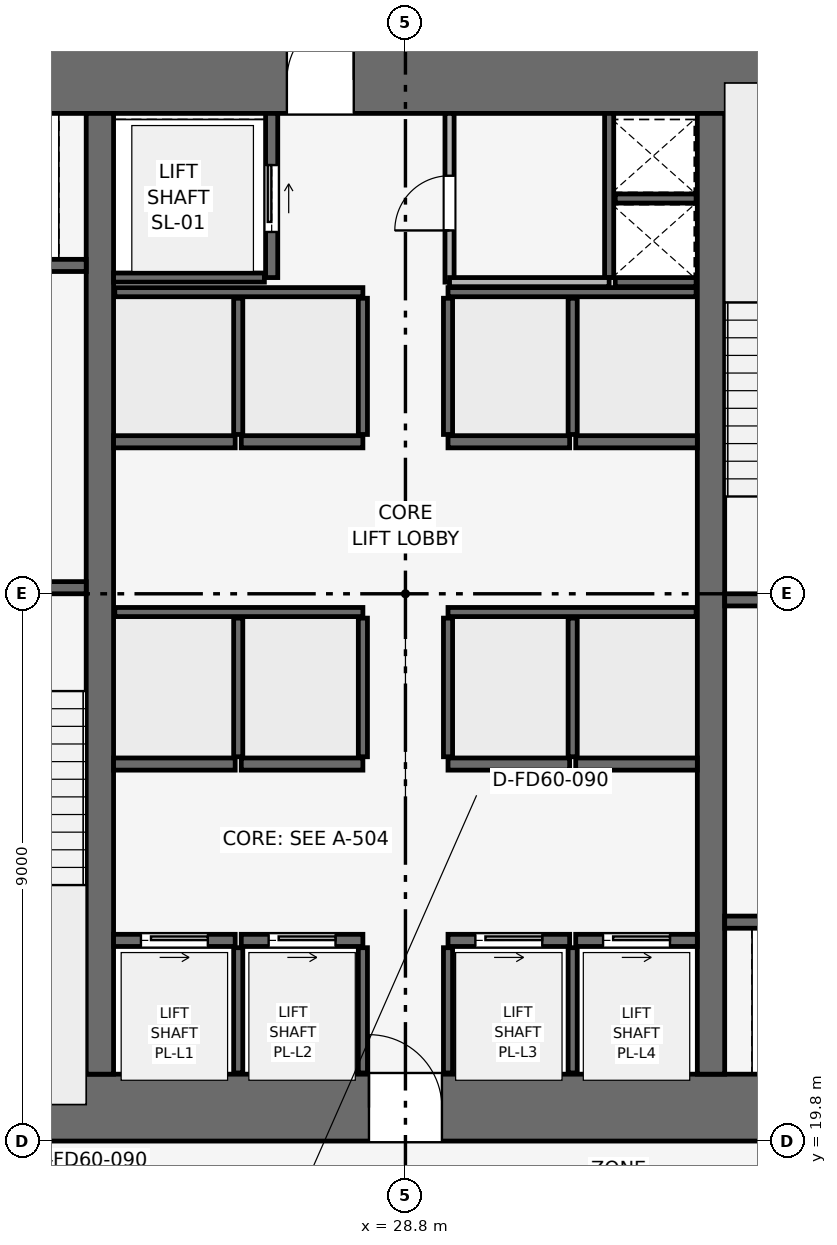
"""IFC4 building model, lengths in metres.
Left out: names, types, materials, properties, quantities, classifications, styles, units other than length and angle.
Written with IfcOpenShell. Run it as: python <this file> out.ifc"""

import sys

from ifc_helpers import new_model, si_unit, direction, frame, frame_2d, origin, place, context, subcontext, project, spatial, rectangle, extrude, element, fill, save


model = new_model("IFC4")
c1 = context("Model", 3, precision=1e-05, world=origin(), true_north=direction((0.0, 1.0)))
c2 = subcontext(c1, "Body", "Model", "MODEL_VIEW")
j1 = project(units=[si_unit("LENGTHUNIT", "METRE"), si_unit("PLANEANGLEUNIT", "RADIAN")], contexts=[c1])
p1 = place(None, origin())
s1 = spatial("IfcSite", under=j1, at=p1, CompositionType="ELEMENT")
p2 = place(p1, origin())
s2 = spatial("IfcBuilding", under=s1, at=p2, CompositionType="ELEMENT")
p3 = place(p2, frame((0.0, 0.0, 37.8)))
s3 = spatial("IfcBuildingStorey", under=s2, at=p3, CompositionType="ELEMENT", Elevation=37.8)
p4 = place(p3, frame((19.8, 20.35, 0.0), z_axis=(0.0, 0.0, 1.0), x_axis=(1.0, 0.0, 0.0)))
e1 = element("IfcWall", 1, at=p4, inside=s3, PredefinedType="SHEAR", context=c2, shape_type="SweptSolid", body=[
    extrude(rectangle(XDim=18.0, YDim=1.1, at=frame_2d((9.0, 0.0))), origin(), (0.0, 0.0, 1.0), 3.9),
])
p5 = place(p4, frame((8.4, 0.0, 0.0)))
e2 = element("IfcOpeningElement", 2, at=p5, cuts=e1, PredefinedType="OPENING", context=c2, shape_type="SweptSolid", body=[
    extrude(rectangle(XDim=1.2, YDim=2.2, at=frame_2d((0.6, 1.1))), frame((0.0, 0.56, 0.0), z_axis=(0.0, -1.0, 0.0), x_axis=(1.0, 0.0, 0.0)), (0.0, 0.0, 1.0), 1.12),
])
p6 = place(p3, frame((19.8, 37.25, 0.0), z_axis=(0.0, 0.0, 1.0), x_axis=(1.0, 0.0, 0.0)))
e3 = element("IfcWall", 3, at=p6, inside=s3, PredefinedType="SHEAR", context=c2, shape_type="SweptSolid", body=[
    extrude(rectangle(XDim=18.0, YDim=1.1, at=frame_2d((9.0, 0.0))), origin(), (0.0, 0.0, 1.0), 3.9),
])
p7 = place(p6, frame((7.05, 0.0, 0.0)))
e4 = element("IfcOpeningElement", 4, at=p7, cuts=e3, PredefinedType="OPENING", context=c2, shape_type="SweptSolid", body=[
    extrude(rectangle(XDim=1.1, YDim=2.15, at=frame_2d((0.55, 1.075))), frame((0.0, 0.56, 0.0), z_axis=(0.0, -1.0, 0.0), x_axis=(1.0, 0.0, 0.0)), (0.0, 0.0, 1.0), 1.12),
])
for number, where, z_axis, x_axis in (
    (5, (23.775, 20.9, 0.0), (0.0, 0.0, 1.0), (0.0, 1.0, 0.0)),
    (6, (33.825, 20.9, 0.0), (0.0, 0.0, 1.0), (0.0, 1.0, 0.0)),
):
    element("IfcWall", number, at=place(p3, frame(where, z_axis=z_axis, x_axis=x_axis)), inside=s3, PredefinedType="SHEAR", context=c2, shape_type="SweptSolid", body=[
        extrude(rectangle(XDim=15.8, YDim=0.45, at=frame_2d((7.9, 0.0))), origin(), (0.0, 0.0, 1.0), 3.9),
    ])
p8 = place(p3, frame((20.4, 28.9, 0.0), z_axis=(0.0, 0.0, 1.0), x_axis=(1.0, 0.0, 0.0)))
e7 = element("IfcWall", 7, at=p8, inside=s3, PredefinedType="SHEAR", context=c2, shape_type="SweptSolid", body=[
    extrude(rectangle(XDim=3.15, YDim=0.2, at=frame_2d((1.575, 0.0))), origin(), (0.0, 0.0, 1.0), 3.65),
])
p9 = place(p8, frame((0.8, 0.0, 0.0)))
e8 = element("IfcOpeningElement", 8, at=p9, cuts=e7, PredefinedType="OPENING", context=c2, shape_type="SweptSolid", body=[
    extrude(rectangle(XDim=1.0, YDim=2.1, at=frame_2d((0.5, 1.05))), frame((0.0, 0.11, 0.0), z_axis=(0.0, -1.0, 0.0), x_axis=(1.0, 0.0, 0.0)), (0.0, 0.0, 1.0), 0.22),
])
p10 = place(p3, frame((34.05, 28.7, 0.0), z_axis=(0.0, 0.0, 1.0), x_axis=(1.0, 0.0, 0.0)))
e9 = element("IfcWall", 9, at=p10, inside=s3, PredefinedType="SHEAR", context=c2, shape_type="SweptSolid", body=[
    extrude(rectangle(XDim=3.15, YDim=0.2, at=frame_2d((1.575, 0.0))), origin(), (0.0, 0.0, 1.0), 3.65),
])
p11 = place(p10, frame((0.8, 0.0, 0.0)))
e10 = element("IfcOpeningElement", 10, at=p11, cuts=e9, PredefinedType="OPENING", context=c2, shape_type="SweptSolid", body=[
    extrude(rectangle(XDim=1.0, YDim=2.1, at=frame_2d((0.5, 1.05))), frame((0.0, 0.11, 0.0), z_axis=(0.0, -1.0, 0.0), x_axis=(1.0, 0.0, 0.0)), (0.0, 0.0, 1.0), 0.22),
])
p12 = place(p3, frame((32.15, 34.0, 0.0), z_axis=(0.0, 0.0, 1.0), x_axis=(0.0, 1.0, 0.0)))
e11 = element("IfcWall", 11, at=p12, inside=s3, PredefinedType="SHEAR", context=c2, shape_type="SweptSolid", body=[
    extrude(rectangle(XDim=2.7, YDim=0.15, at=frame_2d((1.35, 0.0))), origin(), (0.0, 0.0, 1.0), 3.65),
])
for number, where, z_axis, x_axis in (
    (12, (32.25, 33.925, 0.0), (0.0, 0.0, 1.0), (1.0, 0.0, 0.0)),
    (13, (32.25, 35.3, 0.0), (0.0, 0.0, 1.0), (1.0, 0.0, 0.0)),
):
    element("IfcWall", number, at=place(p3, frame(where, z_axis=z_axis, x_axis=x_axis)), inside=s3, PredefinedType="SHEAR", context=c2, shape_type="SweptSolid", body=[
        extrude(rectangle(XDim=1.33, YDim=0.15, at=frame_2d((0.665, 0.0))), origin(), (0.0, 0.0, 1.0), 3.65),
    ])
p13 = place(p3, frame((20.5, 34.2, 0.0), z_axis=(0.0, 0.0, 1.0), x_axis=(1.0, 0.0, 0.0)))
e14 = element("IfcWall", 14, at=p13, inside=s3, PredefinedType="SHEAR", context=c2, shape_type="SweptSolid", body=[
    extrude(rectangle(XDim=3.05, YDim=0.2, at=frame_2d((1.525, 0.0))), origin(), (0.0, 0.0, 1.0), 3.65),
])
p14 = place(p13, frame((0.75, 0.0, 0.0)))
e15 = element("IfcOpeningElement", 15, at=p14, cuts=e14, PredefinedType="OPENING", context=c2, shape_type="SweptSolid", body=[
    extrude(rectangle(XDim=1.1, YDim=2.15, at=frame_2d((0.55, 1.075))), frame((0.0, 0.11, 0.0), z_axis=(0.0, -1.0, 0.0), x_axis=(1.0, 0.0, 0.0)), (0.0, 0.0, 1.0), 0.22),
])
p15 = place(p3, frame((34.05, 23.4, 0.0), z_axis=(0.0, 0.0, 1.0), x_axis=(1.0, 0.0, 0.0)))
e16 = element("IfcWall", 16, at=p15, inside=s3, PredefinedType="SHEAR", context=c2, shape_type="SweptSolid", body=[
    extrude(rectangle(XDim=3.05, YDim=0.2, at=frame_2d((1.525, 0.0))), origin(), (0.0, 0.0, 1.0), 3.65),
])
p16 = place(p15, frame((1.2, 0.0, 0.0)))
e17 = element("IfcOpeningElement", 17, at=p16, cuts=e16, PredefinedType="OPENING", context=c2, shape_type="SweptSolid", body=[
    extrude(rectangle(XDim=1.1, YDim=2.15, at=frame_2d((0.55, 1.075))), frame((0.0, 0.11, 0.0), z_axis=(0.0, -1.0, 0.0), x_axis=(1.0, 0.0, 0.0)), (0.0, 0.0, 1.0), 0.22),
])
p17 = place(p3, frame((26.6, 34.0, 0.0), z_axis=(0.0, 0.0, 1.0), x_axis=(0.0, 1.0, 0.0)))
e18 = element("IfcWall", 18, at=p17, inside=s3, PredefinedType="SHEAR", context=c2, shape_type="SweptSolid", body=[
    extrude(rectangle(XDim=2.7, YDim=0.2, at=frame_2d((1.35, 0.0))), origin(), (0.0, 0.0, 1.0), 3.65),
])
p18 = place(p17, frame((0.75, 0.0, 0.0)))
e19 = element("IfcOpeningElement", 19, at=p18, cuts=e18, PredefinedType="OPENING", context=c2, shape_type="SweptSolid", body=[
    extrude(rectangle(XDim=1.1, YDim=2.15, at=frame_2d((0.55, 1.075))), frame((0.0, 0.11, 0.0), z_axis=(0.0, -1.0, 0.0), x_axis=(1.0, 0.0, 0.0)), (0.0, 0.0, 1.0), 0.22),
])
p19 = place(p3, frame((24.0, 34.0, 0.0), z_axis=(0.0, 0.0, 1.0), x_axis=(1.0, 0.0, 0.0)))
e20 = element("IfcWall", 20, at=p19, inside=s3, PredefinedType="SHEAR", context=c2, shape_type="SweptSolid", body=[
    extrude(rectangle(XDim=2.48, YDim=0.15, at=frame_2d((1.24, 0.0))), origin(), (0.0, 0.0, 1.0), 3.65),
])
p20 = place(p3, frame((24.0, 23.1, 0.0), z_axis=(0.0, 0.0, 1.0), x_axis=(1.0, 0.0, 0.0)))
e21 = element("IfcWall", 21, at=p20, inside=s3, PredefinedType="SHEAR", context=c2, shape_type="SweptSolid", body=[
    extrude(rectangle(XDim=2.0, YDim=0.2, at=frame_2d((1.0, 0.0))), origin(), (0.0, 0.0, 1.0), 3.65),
])
p21 = place(p20, frame((0.45, 0.0, 0.0)))
e22 = element("IfcOpeningElement", 22, at=p21, cuts=e21, PredefinedType="OPENING", context=c2, shape_type="SweptSolid", body=[
    extrude(rectangle(XDim=1.1, YDim=2.15, at=frame_2d((0.55, 1.075))), frame((0.0, 0.11, 0.0), z_axis=(0.0, -1.0, 0.0), x_axis=(1.0, 0.0, 0.0)), (0.0, 0.0, 1.0), 0.22),
])
p22 = place(p3, frame((26.1, 23.1, 0.0), z_axis=(0.0, 0.0, 1.0), x_axis=(1.0, 0.0, 0.0)))
e23 = element("IfcWall", 23, at=p22, inside=s3, PredefinedType="SHEAR", context=c2, shape_type="SweptSolid", body=[
    extrude(rectangle(XDim=2.0, YDim=0.2, at=frame_2d((1.0, 0.0))), origin(), (0.0, 0.0, 1.0), 3.65),
])
p23 = place(p22, frame((0.45, 0.0, 0.0)))
e24 = element("IfcOpeningElement", 24, at=p23, cuts=e23, PredefinedType="OPENING", context=c2, shape_type="SweptSolid", body=[
    extrude(rectangle(XDim=1.1, YDim=2.15, at=frame_2d((0.55, 1.075))), frame((0.0, 0.11, 0.0), z_axis=(0.0, -1.0, 0.0), x_axis=(1.0, 0.0, 0.0)), (0.0, 0.0, 1.0), 0.22),
])
p24 = place(p3, frame((29.5, 23.1, 0.0), z_axis=(0.0, 0.0, 1.0), x_axis=(1.0, 0.0, 0.0)))
e25 = element("IfcWall", 25, at=p24, inside=s3, PredefinedType="SHEAR", context=c2, shape_type="SweptSolid", body=[
    extrude(rectangle(XDim=2.0, YDim=0.2, at=frame_2d((1.0, 0.0))), origin(), (0.0, 0.0, 1.0), 3.65),
])
p25 = place(p24, frame((0.45, 0.0, 0.0)))
e26 = element("IfcOpeningElement", 26, at=p25, cuts=e25, PredefinedType="OPENING", context=c2, shape_type="SweptSolid", body=[
    extrude(rectangle(XDim=1.1, YDim=2.15, at=frame_2d((0.55, 1.075))), frame((0.0, 0.11, 0.0), z_axis=(0.0, -1.0, 0.0), x_axis=(1.0, 0.0, 0.0)), (0.0, 0.0, 1.0), 0.22),
])
p26 = place(p3, frame((31.6, 23.1, 0.0), z_axis=(0.0, 0.0, 1.0), x_axis=(1.0, 0.0, 0.0)))
e27 = element("IfcWall", 27, at=p26, inside=s3, PredefinedType="SHEAR", context=c2, shape_type="SweptSolid", body=[
    extrude(rectangle(XDim=2.0, YDim=0.2, at=frame_2d((1.0, 0.0))), origin(), (0.0, 0.0, 1.0), 3.65),
])
p27 = place(p26, frame((0.45, 0.0, 0.0)))
e28 = element("IfcOpeningElement", 28, at=p27, cuts=e27, PredefinedType="OPENING", context=c2, shape_type="SweptSolid", body=[
    extrude(rectangle(XDim=1.1, YDim=2.15, at=frame_2d((0.55, 1.075))), frame((0.0, 0.11, 0.0), z_axis=(0.0, -1.0, 0.0), x_axis=(1.0, 0.0, 0.0)), (0.0, 0.0, 1.0), 0.22),
])
for number, where, z_axis, x_axis in (
    (29, (24.0, 26.0, 0.0), (0.0, 0.0, 1.0), (1.0, 0.0, 0.0)),
    (30, (26.1, 26.0, 0.0), (0.0, 0.0, 1.0), (1.0, 0.0, 0.0)),
    (31, (29.5, 26.0, 0.0), (0.0, 0.0, 1.0), (1.0, 0.0, 0.0)),
    (32, (31.6, 26.0, 0.0), (0.0, 0.0, 1.0), (1.0, 0.0, 0.0)),
    (33, (24.0, 31.3, 0.0), (0.0, 0.0, 1.0), (1.0, 0.0, 0.0)),
    (34, (26.1, 31.3, 0.0), (0.0, 0.0, 1.0), (1.0, 0.0, 0.0)),
    (35, (29.5, 31.3, 0.0), (0.0, 0.0, 1.0), (1.0, 0.0, 0.0)),
    (36, (31.6, 31.3, 0.0), (0.0, 0.0, 1.0), (1.0, 0.0, 0.0)),
):
    element("IfcWall", number, at=place(p3, frame(where, z_axis=z_axis, x_axis=x_axis)), inside=s3, PredefinedType="SHEAR", context=c2, shape_type="SweptSolid", body=[
        extrude(rectangle(XDim=2.0, YDim=0.2, at=frame_2d((1.0, 0.0))), origin(), (0.0, 0.0, 1.0), 3.65),
    ])
for number, where, z_axis, x_axis in (
    (37, (26.05, 20.92, 0.0), (0.0, 0.0, 1.0), (0.0, 1.0, 0.0)),
    (38, (28.1, 20.92, 0.0), (0.0, 0.0, 1.0), (0.0, 1.0, 0.0)),
    (39, (29.5, 20.92, 0.0), (0.0, 0.0, 1.0), (0.0, 1.0, 0.0)),
    (40, (31.55, 20.92, 0.0), (0.0, 0.0, 1.0), (0.0, 1.0, 0.0)),
):
    element("IfcWall", number, at=place(p3, frame(where, z_axis=z_axis, x_axis=x_axis)), inside=s3, PredefinedType="SHEAR", context=c2, shape_type="SweptSolid", body=[
        extrude(rectangle(XDim=2.06, YDim=0.15, at=frame_2d((1.03, 0.0))), origin(), (0.0, 0.0, 1.0), 3.65),
    ])
for number, where, z_axis, x_axis in (
    (41, (24.02, 28.5, 0.0), (0.0, 0.0, 1.0), (1.0, 0.0, 0.0)),
    (42, (29.5, 28.5, 0.0), (0.0, 0.0, 1.0), (1.0, 0.0, 0.0)),
):
    element("IfcWall", number, at=place(p3, frame(where, z_axis=z_axis, x_axis=x_axis)), inside=s3, PredefinedType="SHEAR", context=c2, shape_type="SweptSolid", body=[
        extrude(rectangle(XDim=4.08, YDim=0.15, at=frame_2d((2.04, 0.0))), origin(), (0.0, 0.0, 1.0), 3.65),
    ])
for number, where, z_axis, x_axis in (
    (43, (26.05, 26.12, 0.0), (0.0, 0.0, 1.0), (0.0, 1.0, 0.0)),
    (44, (28.1, 26.12, 0.0), (0.0, 0.0, 1.0), (0.0, 1.0, 0.0)),
    (45, (29.5, 26.12, 0.0), (0.0, 0.0, 1.0), (0.0, 1.0, 0.0)),
    (46, (31.55, 26.12, 0.0), (0.0, 0.0, 1.0), (0.0, 1.0, 0.0)),
):
    element("IfcWall", number, at=place(p3, frame(where, z_axis=z_axis, x_axis=x_axis)), inside=s3, PredefinedType="SHEAR", context=c2, shape_type="SweptSolid", body=[
        extrude(rectangle(XDim=2.28, YDim=0.15, at=frame_2d((1.14, 0.0))), origin(), (0.0, 0.0, 1.0), 3.65),
    ])
for number, where, z_axis, x_axis in (
    (47, (24.02, 33.76, 0.0), (0.0, 0.0, 1.0), (1.0, 0.0, 0.0)),
    (48, (29.5, 33.76, 0.0), (0.0, 0.0, 1.0), (1.0, 0.0, 0.0)),
):
    element("IfcWall", number, at=place(p3, frame(where, z_axis=z_axis, x_axis=x_axis)), inside=s3, PredefinedType="SHEAR", context=c2, shape_type="SweptSolid", body=[
        extrude(rectangle(XDim=4.08, YDim=0.15, at=frame_2d((2.04, 0.0))), origin(), (0.0, 0.0, 1.0), 3.65),
    ])
for number, where, z_axis, x_axis in (
    (49, (26.05, 31.42, 0.0), (0.0, 0.0, 1.0), (0.0, 1.0, 0.0)),
    (50, (28.1, 31.42, 0.0), (0.0, 0.0, 1.0), (0.0, 1.0, 0.0)),
    (51, (29.5, 31.42, 0.0), (0.0, 0.0, 1.0), (0.0, 1.0, 0.0)),
    (52, (31.55, 31.42, 0.0), (0.0, 0.0, 1.0), (0.0, 1.0, 0.0)),
):
    element("IfcWall", number, at=place(p3, frame(where, z_axis=z_axis, x_axis=x_axis)), inside=s3, PredefinedType="SHEAR", context=c2, shape_type="SweptSolid", body=[
        extrude(rectangle(XDim=2.24, YDim=0.15, at=frame_2d((1.12, 0.0))), origin(), (0.0, 0.0, 1.0), 3.65),
    ])
p28 = place(p3, frame((29.525, 33.925, 0.0), z_axis=(0.0, 0.0, 1.0), x_axis=(0.0, 1.0, 0.0)))
e53 = element("IfcWall", 53, at=p28, inside=s3, PredefinedType="PARTITIONING", context=c2, shape_type="SweptSolid", body=[
    extrude(rectangle(XDim=2.775, YDim=0.15, at=frame_2d((1.387, 0.0))), origin(), (0.0, 0.0, 1.0), 3.65),
])
p29 = place(p28, frame((0.85, 0.0, 0.0)))
e54 = element("IfcOpeningElement", 54, at=p29, cuts=e53, PredefinedType="OPENING", context=c2, shape_type="SweptSolid", body=[
    extrude(rectangle(XDim=0.9, YDim=2.1, at=frame_2d((0.45, 1.05))), frame((0.0, 0.085, 0.0), z_axis=(0.0, -1.0, 0.0), x_axis=(1.0, 0.0, 0.0)), (0.0, 0.0, 1.0), 0.17),
])
p30 = place(p3, frame((29.525, 33.925, 0.0), z_axis=(0.0, 0.0, 1.0), x_axis=(1.0, 0.0, 0.0)))
e55 = element("IfcWall", 55, at=p30, inside=s3, PredefinedType="PARTITIONING", context=c2, shape_type="SweptSolid", body=[
    extrude(rectangle(XDim=2.625, YDim=0.15, at=frame_2d((1.312, 0.0))), origin(), (0.0, 0.0, 1.0), 3.65),
])
p31 = place(p18, origin())
e56 = element("IfcDoor", 56, at=p31, inside=s3, OperationType="SLIDING_TO_RIGHT", PredefinedType="DOOR", context=c2, shape_type="SweptSolid", body=[
    extrude(rectangle(XDim=1.1, YDim=2.15, at=frame_2d((0.55, 1.075))), frame((0.0, 0.025, 0.0), z_axis=(0.0, -1.0, 0.0), x_axis=(1.0, 0.0, 0.0)), (0.0, 0.0, 1.0), 0.05),
])
fill(e19, e56)
p32 = place(p21, origin())
e57 = element("IfcDoor", 57, at=p32, inside=s3, OperationType="SLIDING_TO_RIGHT", PredefinedType="DOOR", context=c2, shape_type="SweptSolid", body=[
    extrude(rectangle(XDim=1.1, YDim=2.15, at=frame_2d((0.55, 1.075))), frame((0.0, 0.025, 0.0), z_axis=(0.0, -1.0, 0.0), x_axis=(1.0, 0.0, 0.0)), (0.0, 0.0, 1.0), 0.05),
])
fill(e22, e57)
p33 = place(p23, origin())
e58 = element("IfcDoor", 58, at=p33, inside=s3, OperationType="SLIDING_TO_RIGHT", PredefinedType="DOOR", context=c2, shape_type="SweptSolid", body=[
    extrude(rectangle(XDim=1.1, YDim=2.15, at=frame_2d((0.55, 1.075))), frame((0.0, 0.025, 0.0), z_axis=(0.0, -1.0, 0.0), x_axis=(1.0, 0.0, 0.0)), (0.0, 0.0, 1.0), 0.05),
])
fill(e24, e58)
p34 = place(p25, origin())
e59 = element("IfcDoor", 59, at=p34, inside=s3, OperationType="SLIDING_TO_RIGHT", PredefinedType="DOOR", context=c2, shape_type="SweptSolid", body=[
    extrude(rectangle(XDim=1.1, YDim=2.15, at=frame_2d((0.55, 1.075))), frame((0.0, 0.025, 0.0), z_axis=(0.0, -1.0, 0.0), x_axis=(1.0, 0.0, 0.0)), (0.0, 0.0, 1.0), 0.05),
])
fill(e26, e59)
p35 = place(p27, origin())
e60 = element("IfcDoor", 60, at=p35, inside=s3, OperationType="SLIDING_TO_RIGHT", PredefinedType="DOOR", context=c2, shape_type="SweptSolid", body=[
    extrude(rectangle(XDim=1.1, YDim=2.15, at=frame_2d((0.55, 1.075))), frame((0.0, 0.025, 0.0), z_axis=(0.0, -1.0, 0.0), x_axis=(1.0, 0.0, 0.0)), (0.0, 0.0, 1.0), 0.05),
])
fill(e28, e60)
p36 = place(p29, origin())
e61 = element("IfcDoor", 61, at=p36, inside=s3, OperationType="SINGLE_SWING_LEFT", PredefinedType="DOOR", context=c2, shape_type="SweptSolid", body=[
    extrude(rectangle(XDim=0.9, YDim=2.1, at=frame_2d((0.45, 1.05))), frame((0.0, 0.025, 0.0), z_axis=(0.0, -1.0, 0.0), x_axis=(1.0, 0.0, 0.0)), (0.0, 0.0, 1.0), 0.05),
])
fill(e54, e61)
p37 = place(p5, origin())
e62 = element("IfcDoor", 62, at=p37, inside=s3, OperationType="SINGLE_SWING_LEFT", PredefinedType="DOOR", context=c2, shape_type="SweptSolid", body=[
    extrude(rectangle(XDim=1.2, YDim=2.2, at=frame_2d((0.6, 1.1))), frame((0.0, 0.025, 0.0), z_axis=(0.0, -1.0, 0.0), x_axis=(1.0, 0.0, 0.0)), (0.0, 0.0, 1.0), 0.05),
])
fill(e2, e62)
p38 = place(p7, origin())
e63 = element("IfcDoor", 63, at=p38, inside=s3, OperationType="SINGLE_SWING_RIGHT", PredefinedType="DOOR", context=c2, shape_type="SweptSolid", body=[
    extrude(rectangle(XDim=1.1, YDim=2.15, at=frame_2d((0.55, 1.075))), frame((0.0, 0.025, 0.0), z_axis=(0.0, -1.0, 0.0), x_axis=(1.0, 0.0, 0.0)), (0.0, 0.0, 1.0), 0.05),
])
fill(e4, e63)
save(model, sys.argv[1])
